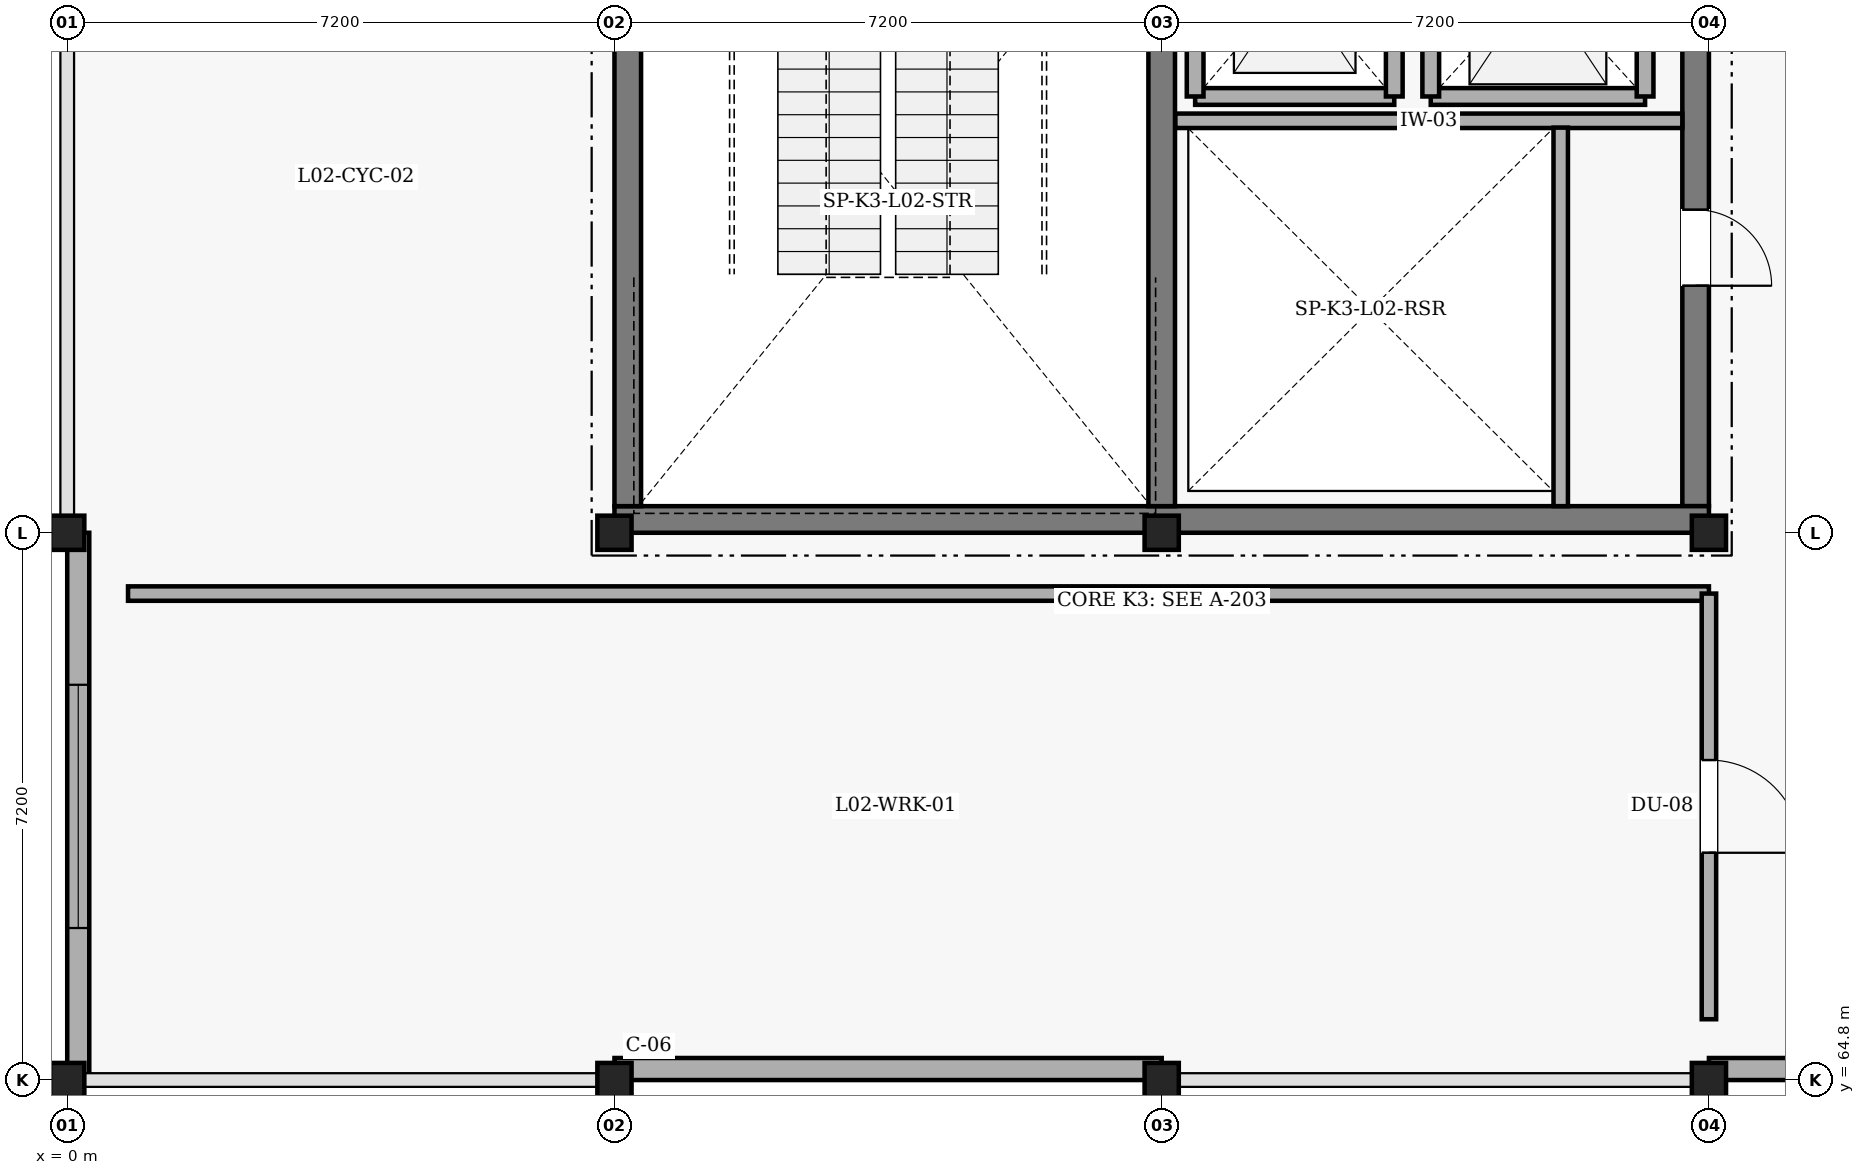
"""IFC4 building model, lengths in metres.
Left out: names, types, materials, properties, quantities, classifications, styles, units other than length and angle.
Written with IfcOpenShell. Run it as: python <this file> out.ifc"""

import sys

from ifc_helpers import new_model, si_unit, direction, frame, frame_2d, origin, origin_2d, place, context, subcontext, project, spatial, rectangle, extrude, element, fill, save


model = new_model("IFC4")
c1 = context("Model", 3, precision=1e-05, world=origin(), true_north=direction((0.0, 1.0)))
c2 = subcontext(c1, "Body", "Model", "MODEL_VIEW")
j1 = project(units=[si_unit("LENGTHUNIT", "METRE"), si_unit("PLANEANGLEUNIT", "RADIAN")], contexts=[c1])
p1 = place(None, origin())
s1 = spatial("IfcSite", under=j1, at=p1, CompositionType="ELEMENT")
p2 = place(p1, origin())
s2 = spatial("IfcBuilding", under=s1, at=p2, CompositionType="ELEMENT")
p3 = place(p2, frame((0.0, 0.0, 9.6)))
s3 = spatial("IfcBuildingStorey", under=s2, at=p3, CompositionType="ELEMENT", Elevation=9.6)
p4 = place(p3, frame((21.425, 86.05, 0.0), z_axis=(0.0, 0.0, 1.0), x_axis=(0.0, -1.0, 0.0)))
e1 = element("IfcWall", 1, at=p4, inside=s3, PredefinedType="SHEAR", context=c2, shape_type="SweptSolid", body=[
    extrude(rectangle(XDim=13.7, YDim=0.35, at=frame_2d((6.85, 0.0))), origin(), (0.0, 0.0, 1.0), 4.2),
])
p5 = place(p4, frame((9.8, 0.0, 0.0)))
e2 = element("IfcOpeningElement", 2, at=p5, cuts=e1, PredefinedType="OPENING", context=c2, shape_type="SweptSolid", body=[
    extrude(rectangle(XDim=1.0, YDim=2.15, at=frame_2d((0.5, 1.075))), frame((0.0, 0.185, 0.0), z_axis=(0.0, -1.0, 0.0), x_axis=(1.0, 0.0, 0.0)), (0.0, 0.0, 1.0), 0.37),
])
p6 = place(p4, frame((2.3, 0.0, 0.0)))
e3 = element("IfcOpeningElement", 3, at=p6, cuts=e1, PredefinedType="OPENING", context=c2, shape_type="SweptSolid", body=[
    extrude(rectangle(XDim=1.25, YDim=2.2, at=frame_2d((0.625, 1.1))), frame((0.0, 0.185, 0.0), z_axis=(0.0, -1.0, 0.0), x_axis=(1.0, 0.0, 0.0)), (0.0, 0.0, 1.0), 0.37),
])
p7 = place(p3, frame((21.6, 72.175, 0.0), z_axis=(0.0, 0.0, 1.0), x_axis=(-1.0, 0.0, 0.0)))
e4 = element("IfcWall", 4, at=p7, inside=s3, PredefinedType="SHEAR", context=c2, shape_type="SweptSolid", body=[
    extrude(rectangle(XDim=14.4, YDim=0.35, at=frame_2d((7.2, 0.0))), origin(), (0.0, 0.0, 1.0), 4.2),
])
p8 = place(p3, frame((7.375, 72.35, 0.0), z_axis=(0.0, 0.0, 1.0), x_axis=(0.0, 1.0, 0.0)))
e5 = element("IfcWall", 5, at=p8, inside=s3, PredefinedType="SHEAR", context=c2, shape_type="SweptSolid", body=[
    extrude(rectangle(XDim=13.7, YDim=0.35, at=frame_2d((6.85, 0.0))), origin(), (0.0, 0.0, 1.0), 4.2),
])
p9 = place(p8, frame((9.8, 0.0, 0.0)))
e6 = element("IfcOpeningElement", 6, at=p9, cuts=e5, PredefinedType="OPENING", context=c2, shape_type="SweptSolid", body=[
    extrude(rectangle(XDim=1.25, YDim=2.2, at=frame_2d((0.625, 1.1))), frame((0.0, 0.185, 0.0), z_axis=(0.0, -1.0, 0.0), x_axis=(1.0, 0.0, 0.0)), (0.0, 0.0, 1.0), 0.37),
])
p10 = place(p3, frame((14.4, 86.05, 0.0), z_axis=(0.0, 0.0, 1.0), x_axis=(0.0, -1.0, 0.0)))
e7 = element("IfcWall", 7, at=p10, inside=s3, PredefinedType="SHEAR", context=c2, shape_type="SweptSolid", body=[
    extrude(rectangle(XDim=13.7, YDim=0.35, at=frame_2d((6.85, 0.0))), origin(), (0.0, 0.0, 1.0), 4.2),
])
p11 = place(p10, frame((1.5, 0.0, 0.0)))
e8 = element("IfcOpeningElement", 8, at=p11, cuts=e7, PredefinedType="OPENING", context=c2, shape_type="SweptSolid", body=[
    extrude(rectangle(XDim=1.25, YDim=2.2, at=frame_2d((0.625, 1.1))), frame((0.0, 0.185, 0.0), z_axis=(0.0, -1.0, 0.0), x_axis=(1.0, 0.0, 0.0)), (0.0, 0.0, 1.0), 0.37),
])
for number, where, z_axis, x_axis in (
    (9, (0.0, 64.8, 0.0), (0.0, 0.0, 1.0), (1.0, 0.0, 0.0)),
    (10, (0.0, 72.0, 0.0), (0.0, 0.0, 1.0), (0.0, 1.0, 0.0)),
    (11, (7.2, 64.8, 0.0), (0.0, 0.0, 1.0), (1.0, 0.0, 0.0)),
    (12, (7.2, 72.0, 0.0), (0.0, 0.0, 1.0), (1.0, 0.0, 0.0)),
    (13, (14.4, 64.8, 0.0), (0.0, 0.0, 1.0), (1.0, 0.0, 0.0)),
    (14, (14.4, 72.0, 0.0), (0.0, 0.0, 1.0), (1.0, 0.0, 0.0)),
    (15, (21.6, 64.8, 0.0), (0.0, 0.0, 1.0), (1.0, 0.0, 0.0)),
    (16, (21.6, 72.0, 0.0), (0.0, 0.0, 1.0), (1.0, 0.0, 0.0)),
):
    element("IfcColumn", number, at=place(p3, frame(where, z_axis=z_axis, x_axis=x_axis)), inside=s3, PredefinedType="COLUMN", context=c2, shape_type="SweptSolid", body=[
        extrude(rectangle(XDim=0.45, YDim=0.45, at=origin_2d()), origin(), (0.0, 0.0, 1.0), 3.9),
    ])
p12 = place(p3, frame((0.145, 64.8, 0.0), z_axis=(0.0, 0.0, 1.0), x_axis=(0.0, 1.0, 0.0)))
e17 = element("IfcWall", 17, at=p12, inside=s3, PredefinedType="SOLIDWALL", context=c2, shape_type="SweptSolid", body=[
    extrude(rectangle(XDim=7.2, YDim=0.29, at=frame_2d((3.6, 0.0))), origin(), (0.0, 0.0, 1.0), 3.6),
])
p13 = place(p12, frame((2.0, 0.0, 0.9)))
e18 = element("IfcOpeningElement", 18, at=p13, cuts=e17, PredefinedType="OPENING", context=c2, shape_type="SweptSolid", body=[
    extrude(rectangle(XDim=3.2, YDim=1.6, at=frame_2d((1.6, 0.8))), frame((0.0, 0.155, 0.0), z_axis=(0.0, -1.0, 0.0), x_axis=(1.0, 0.0, 0.0)), (0.0, 0.0, 1.0), 0.31),
])
p14 = place(p3, frame((28.8, 64.945, 0.0), z_axis=(0.0, 0.0, 1.0), x_axis=(-1.0, 0.0, 0.0)))
e19 = element("IfcWall", 19, at=p14, inside=s3, PredefinedType="SOLIDWALL", context=c2, shape_type="SweptSolid", body=[
    extrude(rectangle(XDim=7.2, YDim=0.29, at=frame_2d((3.6, 0.0))), origin(), (0.0, 0.0, 1.0), 3.6),
])
p15 = place(p14, frame((2.525, 0.0, 0.9)))
e20 = element("IfcOpeningElement", 20, at=p15, cuts=e19, PredefinedType="OPENING", context=c2, shape_type="SweptSolid", body=[
    extrude(rectangle(XDim=2.15, YDim=1.65, at=frame_2d((1.075, 0.825))), frame((0.0, 0.155, 0.0), z_axis=(0.0, -1.0, 0.0), x_axis=(1.0, 0.0, 0.0)), (0.0, 0.0, 1.0), 0.31),
])
p16 = place(p3, frame((14.4, 64.945, 0.0), z_axis=(0.0, 0.0, 1.0), x_axis=(-1.0, 0.0, 0.0)))
e21 = element("IfcWall", 21, at=p16, inside=s3, PredefinedType="SOLIDWALL", context=c2, shape_type="SweptSolid", body=[
    extrude(rectangle(XDim=7.2, YDim=0.29, at=frame_2d((3.6, 0.0))), origin(), (0.0, 0.0, 1.0), 3.6),
])
p17 = place(p3, frame((14.58, 77.42, 0.0), z_axis=(0.0, 0.0, 1.0), x_axis=(1.0, 0.0, 0.0)))
e22 = element("IfcWall", 22, at=p17, inside=s3, PredefinedType="PARTITIONING", context=c2, shape_type="SweptSolid", body=[
    extrude(rectangle(XDim=6.67, YDim=0.19, at=frame_2d((3.335, 0.0))), origin(), (0.0, 0.0, 1.0), 3.85),
])
p18 = place(p3, frame((19.65, 72.35, 0.0), z_axis=(0.0, 0.0, 1.0), x_axis=(0.0, 1.0, 0.0)))
e23 = element("IfcWall", 23, at=p18, inside=s3, PredefinedType="PARTITIONING", context=c2, shape_type="SweptSolid", body=[
    extrude(rectangle(XDim=4.98, YDim=0.19, at=frame_2d((2.49, 0.0))), origin(), (0.0, 0.0, 1.0), 3.85),
])
p19 = place(p3, frame((14.84, 77.74, 0.0), z_axis=(0.0, 0.0, 1.0), x_axis=(1.0, 0.0, 0.0)))
e24 = element("IfcWall", 24, at=p19, inside=s3, PredefinedType="PARTITIONING", context=c2, shape_type="SweptSolid", body=[
    extrude(rectangle(XDim=2.62, YDim=0.22, at=frame_2d((1.31, 0.0))), origin(), (0.0, 0.0, 1.0), 3.85),
])
for number, where, z_axis, x_axis in (
    (25, (14.84, 77.74, 0.0), (0.0, 0.0, 1.0), (0.0, 1.0, 0.0)),
    (26, (17.46, 77.74, 0.0), (0.0, 0.0, 1.0), (0.0, 1.0, 0.0)),
):
    element("IfcWall", number, at=place(p3, frame(where, z_axis=z_axis, x_axis=x_axis)), inside=s3, PredefinedType="PARTITIONING", context=c2, shape_type="SweptSolid", body=[
        extrude(rectangle(XDim=3.0, YDim=0.22, at=frame_2d((1.5, 0.0))), origin(), (0.0, 0.0, 1.0), 3.85),
    ])
p20 = place(p3, frame((17.94, 77.74, 0.0), z_axis=(0.0, 0.0, 1.0), x_axis=(1.0, 0.0, 0.0)))
e27 = element("IfcWall", 27, at=p20, inside=s3, PredefinedType="PARTITIONING", context=c2, shape_type="SweptSolid", body=[
    extrude(rectangle(XDim=2.82, YDim=0.22, at=frame_2d((1.41, 0.0))), origin(), (0.0, 0.0, 1.0), 3.85),
])
for number, where, z_axis, x_axis in (
    (28, (17.94, 77.74, 0.0), (0.0, 0.0, 1.0), (0.0, 1.0, 0.0)),
    (29, (20.76, 77.74, 0.0), (0.0, 0.0, 1.0), (0.0, 1.0, 0.0)),
):
    element("IfcWall", number, at=place(p3, frame(where, z_axis=z_axis, x_axis=x_axis)), inside=s3, PredefinedType="PARTITIONING", context=c2, shape_type="SweptSolid", body=[
        extrude(rectangle(XDim=3.0, YDim=0.22, at=frame_2d((1.5, 0.0))), origin(), (0.0, 0.0, 1.0), 3.85),
    ])
p21 = place(p3, frame((0.8, 71.2, 0.0), z_axis=(0.0, 0.0, 1.0), x_axis=(1.0, 0.0, 0.0)))
e30 = element("IfcWall", 30, at=p21, inside=s3, PredefinedType="PARTITIONING", context=c2, shape_type="SweptSolid", body=[
    extrude(rectangle(XDim=20.8, YDim=0.19, at=frame_2d((10.4, 0.0))), origin(), (0.0, 0.0, 1.0), 3.5),
])
p22 = place(p3, frame((21.6, 71.2, 0.0), z_axis=(0.0, 0.0, 1.0), x_axis=(0.0, -1.0, 0.0)))
e31 = element("IfcWall", 31, at=p22, inside=s3, PredefinedType="PARTITIONING", context=c2, shape_type="SweptSolid", body=[
    extrude(rectangle(XDim=5.6, YDim=0.19, at=frame_2d((2.8, 0.0))), origin(), (0.0, 0.0, 1.0), 3.5),
])
p23 = place(p22, frame((2.19, 0.0, 0.0)))
e32 = element("IfcOpeningElement", 32, at=p23, cuts=e31, PredefinedType="OPENING", context=c2, shape_type="SweptSolid", body=[
    extrude(rectangle(XDim=1.22, YDim=2.22, at=frame_2d((0.61, 1.11))), frame((0.0, 0.105, 0.0), z_axis=(0.0, -1.0, 0.0), x_axis=(1.0, 0.0, 0.0)), (0.0, 0.0, 1.0), 0.21),
])
p24 = place(p13, origin())
e33 = element("IfcWindow", 33, at=p24, inside=s3, PartitioningType="SINGLE_PANEL", PredefinedType="WINDOW", context=c2, shape_type="SweptSolid", body=[
    extrude(rectangle(XDim=3.2, YDim=1.6, at=frame_2d((1.6, 0.8))), frame((0.0, 0.03, 0.0), z_axis=(0.0, -1.0, 0.0), x_axis=(1.0, 0.0, 0.0)), (0.0, 0.0, 1.0), 0.06),
])
fill(e18, e33)
p25 = place(p5, origin())
e34 = element("IfcDoor", 34, at=p25, inside=s3, OperationType="SINGLE_SWING_RIGHT", PredefinedType="DOOR", context=c2, shape_type="SweptSolid", body=[
    extrude(rectangle(XDim=1.0, YDim=2.15, at=frame_2d((0.5, 1.075))), frame((0.0, 0.025, 0.0), z_axis=(0.0, -1.0, 0.0), x_axis=(1.0, 0.0, 0.0)), (0.0, 0.0, 1.0), 0.05),
])
fill(e2, e34)
p26 = place(p23, origin())
e35 = element("IfcDoor", 35, at=p26, inside=s3, OperationType="SINGLE_SWING_RIGHT", PredefinedType="DOOR", context=c2, shape_type="SweptSolid", body=[
    extrude(rectangle(XDim=1.22, YDim=2.22, at=frame_2d((0.61, 1.11))), frame((0.0, 0.025, 0.0), z_axis=(0.0, -1.0, 0.0), x_axis=(1.0, 0.0, 0.0)), (0.0, 0.0, 1.0), 0.05),
])
fill(e32, e35)
save(model, sys.argv[1])
